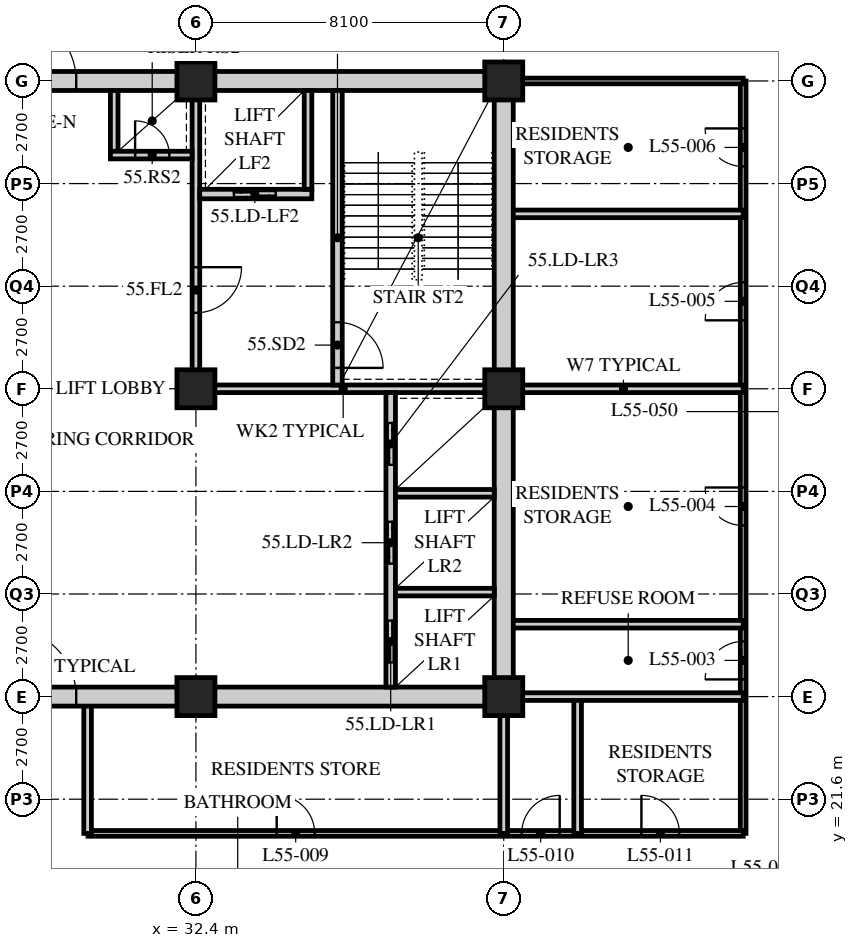
"""IFC4 building model, lengths in metres.
Left out: names, types, materials, properties, quantities, classifications, styles, units other than length and angle.
Written with IfcOpenShell. Run it as: python <this file> out.ifc"""

import sys

from ifc_helpers import new_model, si_unit, direction, frame, frame_2d, origin, origin_2d, place, context, subcontext, project, spatial, rectangle, hollow_rectangle, extrude, element, fill, save


model = new_model("IFC4")
c1 = context("Model", 3, precision=1e-05, world=origin(), true_north=direction((0.0, 1.0)))
c2 = subcontext(c1, "Body", "Model", "MODEL_VIEW")
j1 = project(units=[si_unit("LENGTHUNIT", "METRE"), si_unit("PLANEANGLEUNIT", "RADIAN")], contexts=[c1])
p1 = place(None, origin())
s1 = spatial("IfcSite", under=j1, at=p1, CompositionType="ELEMENT")
p2 = place(p1, origin())
s2 = spatial("IfcBuilding", under=s1, at=p2, CompositionType="ELEMENT")
p3 = place(p2, frame((0.0, 0.0, 213.6)))
s3 = spatial("IfcBuildingStorey", under=s2, at=p3, CompositionType="ELEMENT", Elevation=213.6)
for number, where, z_axis, x_axis in (
    (1, (32.4, 24.3, 0.0), (0.0, 0.0, 1.0), (1.0, 0.0, 0.0)),
    (2, (32.4, 32.4, 0.0), (0.0, 0.0, 1.0), (1.0, 0.0, 0.0)),
    (3, (32.4, 40.5, 0.0), (0.0, 0.0, 1.0), (1.0, 0.0, 0.0)),
    (4, (40.5, 24.3, 0.0), (0.0, 0.0, 1.0), (1.0, 0.0, 0.0)),
    (5, (40.5, 32.4, 0.0), (0.0, 0.0, 1.0), (1.0, 0.0, 0.0)),
    (6, (40.5, 40.5, 0.0), (0.0, 0.0, 1.0), (1.0, 0.0, 0.0)),
):
    element("IfcColumn", number, at=place(p3, frame(where, z_axis=z_axis, x_axis=x_axis)), inside=s3, PredefinedType="COLUMN", context=c2, shape_type="SweptSolid", body=[
        extrude(hollow_rectangle(XDim=1.0, YDim=1.0, WallThickness=0.1, at=origin_2d()), origin(), (0.0, 0.0, 1.0), 3.6),
    ])
p4 = place(p3, frame((46.8, 20.7, 0.0), z_axis=(0.0, 0.0, 1.0), x_axis=(0.0, 1.0, 0.0)))
e7 = element("IfcWall", 7, at=p4, inside=s3, PredefinedType="PARTITIONING", context=c2, shape_type="SweptSolid", body=[
    extrude(rectangle(XDim=19.8, YDim=0.15, at=frame_2d((9.9, 0.0))), origin(), (0.0, 0.0, 1.0), 3.39),
])
p5 = place(p4, frame((4.052, 0.0, 0.0)))
e8 = element("IfcOpeningElement", 8, at=p5, cuts=e7, PredefinedType="OPENING", context=c2, shape_type="SweptSolid", body=[
    extrude(rectangle(XDim=1.0, YDim=2.1, at=frame_2d((0.5, 1.05))), frame((0.0, 0.085, 0.0), z_axis=(0.0, -1.0, 0.0), x_axis=(1.0, 0.0, 0.0)), (0.0, 0.0, 1.0), 0.17),
])
p6 = place(p4, frame((8.102, 0.0, 0.0)))
e9 = element("IfcOpeningElement", 9, at=p6, cuts=e7, PredefinedType="OPENING", context=c2, shape_type="SweptSolid", body=[
    extrude(rectangle(XDim=1.0, YDim=2.1, at=frame_2d((0.5, 1.05))), frame((0.0, 0.085, 0.0), z_axis=(0.0, -1.0, 0.0), x_axis=(1.0, 0.0, 0.0)), (0.0, 0.0, 1.0), 0.17),
])
p7 = place(p4, frame((13.502, 0.0, 0.0)))
e10 = element("IfcOpeningElement", 10, at=p7, cuts=e7, PredefinedType="OPENING", context=c2, shape_type="SweptSolid", body=[
    extrude(rectangle(XDim=1.0, YDim=2.1, at=frame_2d((0.5, 1.05))), frame((0.0, 0.085, 0.0), z_axis=(0.0, -1.0, 0.0), x_axis=(1.0, 0.0, 0.0)), (0.0, 0.0, 1.0), 0.17),
])
p8 = place(p4, frame((17.552, 0.0, 0.0)))
e11 = element("IfcOpeningElement", 11, at=p8, cuts=e7, PredefinedType="OPENING", context=c2, shape_type="SweptSolid", body=[
    extrude(rectangle(XDim=1.0, YDim=2.1, at=frame_2d((0.5, 1.05))), frame((0.0, 0.085, 0.0), z_axis=(0.0, -1.0, 0.0), x_axis=(1.0, 0.0, 0.0)), (0.0, 0.0, 1.0), 0.17),
])
p9 = place(p3, frame((46.8, 40.5, 0.0), z_axis=(0.0, 0.0, 1.0), x_axis=(-1.0, 0.0, 0.0)))
e12 = element("IfcWall", 12, at=p9, inside=s3, PredefinedType="PARTITIONING", context=c2, shape_type="SweptSolid", body=[
    extrude(rectangle(XDim=6.1, YDim=0.15, at=frame_2d((3.05, 0.0))), origin(), (0.0, 0.0, 1.0), 3.39),
])
p10 = place(p3, frame((29.56, 20.7, 0.0), z_axis=(0.0, 0.0, 1.0), x_axis=(1.0, 0.0, 0.0)))
e13 = element("IfcWall", 13, at=p10, inside=s3, PredefinedType="PARTITIONING", context=c2, shape_type="SweptSolid", body=[
    extrude(rectangle(XDim=17.24, YDim=0.15, at=frame_2d((8.62, 0.0))), origin(), (0.0, 0.0, 1.0), 3.39),
])
p11 = place(p10, frame((4.965, 0.0, 0.0)))
e14 = element("IfcOpeningElement", 14, at=p11, cuts=e13, PredefinedType="OPENING", context=c2, shape_type="SweptSolid", body=[
    extrude(rectangle(XDim=1.0, YDim=2.1, at=frame_2d((0.5, 1.05))), frame((0.0, 0.085, 0.0), z_axis=(0.0, -1.0, 0.0), x_axis=(1.0, 0.0, 0.0)), (0.0, 0.0, 1.0), 0.17),
])
p12 = place(p10, frame((11.412, 0.0, 0.0)))
e15 = element("IfcOpeningElement", 15, at=p12, cuts=e13, PredefinedType="OPENING", context=c2, shape_type="SweptSolid", body=[
    extrude(rectangle(XDim=1.0, YDim=2.1, at=frame_2d((0.5, 1.05))), frame((0.0, 0.085, 0.0), z_axis=(0.0, -1.0, 0.0), x_axis=(1.0, 0.0, 0.0)), (0.0, 0.0, 1.0), 0.17),
])
p13 = place(p10, frame((14.562, 0.0, 0.0)))
e16 = element("IfcOpeningElement", 16, at=p13, cuts=e13, PredefinedType="OPENING", context=c2, shape_type="SweptSolid", body=[
    extrude(rectangle(XDim=1.0, YDim=2.1, at=frame_2d((0.5, 1.05))), frame((0.0, 0.085, 0.0), z_axis=(0.0, -1.0, 0.0), x_axis=(1.0, 0.0, 0.0)), (0.0, 0.0, 1.0), 0.17),
])
for number, where, z_axis, x_axis in (
    (17, (40.5, 32.4, 0.0), (0.0, 0.0, 1.0), (1.0, 0.0, 0.0)),
    (18, (46.8, 26.205, 0.0), (0.0, 0.0, 1.0), (-1.0, 0.0, 0.0)),
    (19, (46.8, 37.003, 0.0), (0.0, 0.0, 1.0), (-1.0, 0.0, 0.0)),
):
    element("IfcWall", number, at=place(p3, frame(where, z_axis=z_axis, x_axis=x_axis)), inside=s3, PredefinedType="SOLIDWALL", context=c2, shape_type="SweptSolid", body=[
        extrude(rectangle(XDim=6.3, YDim=0.2, at=frame_2d((3.15, 0.0))), origin(), (0.0, 0.0, 1.0), 3.39),
    ])
p14 = place(p3, frame((40.5, 20.7, 0.0), z_axis=(0.0, 0.0, 1.0), x_axis=(0.0, 1.0, 0.0)))
e20 = element("IfcWall", 20, at=p14, inside=s3, PredefinedType="SOLIDWALL", context=c2, shape_type="SweptSolid", body=[
    extrude(rectangle(XDim=3.6, YDim=0.2, at=frame_2d((1.8, 0.0))), origin(), (0.0, 0.0, 1.0), 2.778),
])
for number, where, z_axis, x_axis in (
    (21, (42.444, 20.7, 0.0), (0.0, 0.0, 1.0), (0.0, 1.0, 0.0)),
    (22, (29.55, 20.7, 0.0), (0.0, 0.0, 1.0), (0.0, 1.0, 0.0)),
):
    element("IfcWall", number, at=place(p3, frame(where, z_axis=z_axis, x_axis=x_axis)), inside=s3, PredefinedType="SOLIDWALL", context=c2, shape_type="SweptSolid", body=[
        extrude(rectangle(XDim=3.6, YDim=0.2, at=frame_2d((1.8, 0.0))), origin(), (0.0, 0.0, 1.0), 3.39),
    ])
p15 = place(p3, frame((40.5, 24.3, 0.0), z_axis=(0.0, 0.0, 1.0), x_axis=(1.0, 0.0, 0.0)))
e23 = element("IfcWall", 23, at=p15, inside=s3, PredefinedType="SOLIDWALL", context=c2, shape_type="SweptSolid", body=[
    extrude(rectangle(XDim=6.3, YDim=0.2, at=frame_2d((3.15, 0.0))), origin(), (0.0, 0.0, 1.0), 3.39),
])
p16 = place(p3, frame((15.95, 24.3, 0.0), z_axis=(0.0, 0.0, 1.0), x_axis=(1.0, 0.0, 0.0)))
e24 = element("IfcWall", 24, at=p16, inside=s3, PredefinedType="SOLIDWALL", context=c2, shape_type="SweptSolid", body=[
    extrude(rectangle(XDim=24.8, YDim=0.5, at=frame_2d((12.4, 0.0))), origin(), (0.0, 0.0, 1.0), 2.74),
])
p17 = place(p16, frame((11.5, 0.0, 0.0)))
e25 = element("IfcOpeningElement", 25, at=p17, cuts=e24, PredefinedType="OPENING", context=c2, shape_type="SweptSolid", body=[
    extrude(rectangle(XDim=1.8, YDim=2.4, at=frame_2d((0.9, 1.2))), frame((0.0, 0.26, 0.0), z_axis=(0.0, -1.0, 0.0), x_axis=(1.0, 0.0, 0.0)), (0.0, 0.0, 1.0), 0.52),
])
p18 = place(p3, frame((15.95, 40.5, 0.0), z_axis=(0.0, 0.0, 1.0), x_axis=(1.0, 0.0, 0.0)))
e26 = element("IfcWall", 26, at=p18, inside=s3, PredefinedType="SOLIDWALL", context=c2, shape_type="SweptSolid", body=[
    extrude(rectangle(XDim=24.8, YDim=0.5, at=frame_2d((12.4, 0.0))), origin(), (0.0, 0.0, 1.0), 2.74),
])
p19 = place(p18, frame((11.5, 0.0, 0.0)))
e27 = element("IfcOpeningElement", 27, at=p19, cuts=e26, PredefinedType="OPENING", context=c2, shape_type="SweptSolid", body=[
    extrude(rectangle(XDim=1.8, YDim=2.4, at=frame_2d((0.9, 1.2))), frame((0.0, 0.26, 0.0), z_axis=(0.0, -1.0, 0.0), x_axis=(1.0, 0.0, 0.0)), (0.0, 0.0, 1.0), 0.52),
])
p20 = place(p3, frame((40.5, 24.55, 0.0), z_axis=(0.0, 0.0, 1.0), x_axis=(0.0, 1.0, 0.0)))
e28 = element("IfcWall", 28, at=p20, inside=s3, PredefinedType="SOLIDWALL", context=c2, shape_type="SweptSolid", body=[
    extrude(rectangle(XDim=15.7, YDim=0.5, at=frame_2d((7.85, 0.0))), origin(), (0.0, 0.0, 1.0), 2.778),
])
p21 = place(p3, frame((32.3, 32.4, 0.0), z_axis=(0.0, 0.0, 1.0), x_axis=(1.0, 0.0, 0.0)))
e29 = element("IfcWall", 29, at=p21, inside=s3, PredefinedType="SOLIDWALL", context=c2, shape_type="SweptSolid", body=[
    extrude(rectangle(XDim=7.95, YDim=0.2, at=frame_2d((3.975, 0.0))), origin(), (0.0, 0.0, 1.0), 2.778),
])
p22 = place(p3, frame((32.4, 32.5, 0.0), z_axis=(0.0, 0.0, 1.0), x_axis=(0.0, 1.0, 0.0)))
e30 = element("IfcWall", 30, at=p22, inside=s3, PredefinedType="SOLIDWALL", context=c2, shape_type="SweptSolid", body=[
    extrude(rectangle(XDim=7.75, YDim=0.2, at=frame_2d((3.875, 0.0))), origin(), (0.0, 0.0, 1.0), 2.778),
])
p23 = place(p22, frame((1.9, 0.0, 0.0)))
e31 = element("IfcOpeningElement", 31, at=p23, cuts=e30, PredefinedType="OPENING", context=c2, shape_type="SweptSolid", body=[
    extrude(rectangle(XDim=1.2, YDim=2.1, at=frame_2d((0.6, 1.05))), frame((0.0, 0.11, 0.0), z_axis=(0.0, -1.0, 0.0), x_axis=(1.0, 0.0, 0.0)), (0.0, 0.0, 1.0), 0.22),
])
p24 = place(p3, frame((37.525, 24.55, 0.0), z_axis=(0.0, 0.0, 1.0), x_axis=(0.0, 1.0, 0.0)))
e32 = element("IfcWall", 32, at=p24, inside=s3, PredefinedType="SOLIDWALL", context=c2, shape_type="SweptSolid", body=[
    extrude(rectangle(XDim=7.75, YDim=0.25, at=frame_2d((3.875, 0.0))), origin(), (0.0, 0.0, 1.0), 3.39),
])
p25 = place(p24, frame((0.65, 0.0, 0.0)))
e33 = element("IfcOpeningElement", 33, at=p25, cuts=e32, PredefinedType="OPENING", context=c2, shape_type="SweptSolid", body=[
    extrude(rectangle(XDim=1.1, YDim=2.4, at=frame_2d((0.55, 1.2))), frame((0.0, 0.135, 0.0), z_axis=(0.0, -1.0, 0.0), x_axis=(1.0, 0.0, 0.0)), (0.0, 0.0, 1.0), 0.27),
])
p26 = place(p24, frame((3.25, 0.0, 0.0)))
e34 = element("IfcOpeningElement", 34, at=p26, cuts=e32, PredefinedType="OPENING", context=c2, shape_type="SweptSolid", body=[
    extrude(rectangle(XDim=1.1, YDim=2.4, at=frame_2d((0.55, 1.2))), frame((0.0, 0.135, 0.0), z_axis=(0.0, -1.0, 0.0), x_axis=(1.0, 0.0, 0.0)), (0.0, 0.0, 1.0), 0.27),
])
p27 = place(p24, frame((5.85, 0.0, 0.0)))
e35 = element("IfcOpeningElement", 35, at=p27, cuts=e32, PredefinedType="OPENING", context=c2, shape_type="SweptSolid", body=[
    extrude(rectangle(XDim=1.1, YDim=2.4, at=frame_2d((0.55, 1.2))), frame((0.0, 0.135, 0.0), z_axis=(0.0, -1.0, 0.0), x_axis=(1.0, 0.0, 0.0)), (0.0, 0.0, 1.0), 0.27),
])
for number, where, z_axis, x_axis in (
    (36, (37.65, 27.05, 0.0), (0.0, 0.0, 1.0), (1.0, 0.0, 0.0)),
    (37, (37.65, 29.65, 0.0), (0.0, 0.0, 1.0), (1.0, 0.0, 0.0)),
):
    element("IfcWall", number, at=place(p3, frame(where, z_axis=z_axis, x_axis=x_axis)), inside=s3, PredefinedType="SOLIDWALL", context=c2, shape_type="SweptSolid", body=[
        extrude(rectangle(XDim=2.6, YDim=0.2, at=frame_2d((1.3, 0.0))), origin(), (0.0, 0.0, 1.0), 3.39),
    ])
p28 = place(p3, frame((36.125, 32.5, 0.0), z_axis=(0.0, 0.0, 1.0), x_axis=(0.0, 1.0, 0.0)))
e38 = element("IfcWall", 38, at=p28, inside=s3, PredefinedType="SOLIDWALL", context=c2, shape_type="SweptSolid", body=[
    extrude(rectangle(XDim=7.75, YDim=0.25, at=frame_2d((3.875, 0.0))), origin(), (0.0, 0.0, 1.0), 3.39),
])
p29 = place(p28, frame((0.45, 0.0, 0.0)))
e39 = element("IfcOpeningElement", 39, at=p29, cuts=e38, PredefinedType="OPENING", context=c2, shape_type="SweptSolid", body=[
    extrude(rectangle(XDim=1.2, YDim=2.1, at=frame_2d((0.6, 1.05))), frame((0.0, 0.135, 0.0), z_axis=(0.0, -1.0, 0.0), x_axis=(1.0, 0.0, 0.0)), (0.0, 0.0, 1.0), 0.27),
])
p30 = place(p3, frame((32.5, 37.525, 0.0), z_axis=(0.0, 0.0, 1.0), x_axis=(1.0, 0.0, 0.0)))
e40 = element("IfcWall", 40, at=p30, inside=s3, PredefinedType="SOLIDWALL", context=c2, shape_type="SweptSolid", body=[
    extrude(rectangle(XDim=2.95, YDim=0.25, at=frame_2d((1.475, 0.0))), origin(), (0.0, 0.0, 1.0), 3.39),
])
p31 = place(p30, frame((0.9, 0.0, 0.0)))
e41 = element("IfcOpeningElement", 41, at=p31, cuts=e40, PredefinedType="OPENING", context=c2, shape_type="SweptSolid", body=[
    extrude(rectangle(XDim=1.1, YDim=2.4, at=frame_2d((0.55, 1.2))), frame((0.0, 0.135, 0.0), z_axis=(0.0, -1.0, 0.0), x_axis=(1.0, 0.0, 0.0)), (0.0, 0.0, 1.0), 0.27),
])
p32 = place(p3, frame((35.35, 37.65, 0.0), z_axis=(0.0, 0.0, 1.0), x_axis=(0.0, 1.0, 0.0)))
e42 = element("IfcWall", 42, at=p32, inside=s3, PredefinedType="SOLIDWALL", context=c2, shape_type="SweptSolid", body=[
    extrude(rectangle(XDim=2.6, YDim=0.2, at=frame_2d((1.3, 0.0))), origin(), (0.0, 0.0, 1.0), 3.39),
])
p33 = place(p3, frame((30.25, 38.65, 0.0), z_axis=(0.0, 0.0, 1.0), x_axis=(0.0, 1.0, 0.0)))
e43 = element("IfcWall", 43, at=p33, inside=s3, PredefinedType="SOLIDWALL", context=c2, shape_type="SweptSolid", body=[
    extrude(rectangle(XDim=1.6, YDim=0.2, at=frame_2d((0.8, 0.0))), origin(), (0.0, 0.0, 1.0), 3.39),
])
p34 = place(p3, frame((30.15, 38.55, 0.0), z_axis=(0.0, 0.0, 1.0), x_axis=(1.0, 0.0, 0.0)))
e44 = element("IfcWall", 44, at=p34, inside=s3, PredefinedType="SOLIDWALL", context=c2, shape_type="SweptSolid", body=[
    extrude(rectangle(XDim=2.15, YDim=0.2, at=frame_2d((1.075, 0.0))), origin(), (0.0, 0.0, 1.0), 3.39),
])
p35 = place(p34, frame((0.65, 0.0, 0.0)))
e45 = element("IfcOpeningElement", 45, at=p35, cuts=e44, PredefinedType="OPENING", context=c2, shape_type="SweptSolid", body=[
    extrude(rectangle(XDim=0.9, YDim=2.1, at=frame_2d((0.45, 1.05))), frame((0.0, 0.11, 0.0), z_axis=(0.0, -1.0, 0.0), x_axis=(1.0, 0.0, 0.0)), (0.0, 0.0, 1.0), 0.22),
])
p36 = place(p5, origin())
e46 = element("IfcDoor", 46, at=p36, inside=s3, OperationType="SINGLE_SWING_LEFT", PredefinedType="DOOR", context=c2, shape_type="SweptSolid", body=[
    extrude(rectangle(XDim=1.0, YDim=2.1, at=frame_2d((0.5, 1.05))), frame((0.0, 0.025, 0.0), z_axis=(0.0, -1.0, 0.0), x_axis=(1.0, 0.0, 0.0)), (0.0, 0.0, 1.0), 0.05),
])
fill(e8, e46)
p37 = place(p6, origin())
e47 = element("IfcDoor", 47, at=p37, inside=s3, OperationType="SINGLE_SWING_RIGHT", PredefinedType="DOOR", context=c2, shape_type="SweptSolid", body=[
    extrude(rectangle(XDim=1.0, YDim=2.1, at=frame_2d((0.5, 1.05))), frame((0.0, 0.025, 0.0), z_axis=(0.0, -1.0, 0.0), x_axis=(1.0, 0.0, 0.0)), (0.0, 0.0, 1.0), 0.05),
])
fill(e9, e47)
p38 = place(p7, origin())
e48 = element("IfcDoor", 48, at=p38, inside=s3, OperationType="SINGLE_SWING_LEFT", PredefinedType="DOOR", context=c2, shape_type="SweptSolid", body=[
    extrude(rectangle(XDim=1.0, YDim=2.1, at=frame_2d((0.5, 1.05))), frame((0.0, 0.025, 0.0), z_axis=(0.0, -1.0, 0.0), x_axis=(1.0, 0.0, 0.0)), (0.0, 0.0, 1.0), 0.05),
])
fill(e10, e48)
p39 = place(p8, origin())
e49 = element("IfcDoor", 49, at=p39, inside=s3, OperationType="SINGLE_SWING_RIGHT", PredefinedType="DOOR", context=c2, shape_type="SweptSolid", body=[
    extrude(rectangle(XDim=1.0, YDim=2.1, at=frame_2d((0.5, 1.05))), frame((0.0, 0.025, 0.0), z_axis=(0.0, -1.0, 0.0), x_axis=(1.0, 0.0, 0.0)), (0.0, 0.0, 1.0), 0.05),
])
fill(e11, e49)
p40 = place(p11, origin())
e50 = element("IfcDoor", 50, at=p40, inside=s3, OperationType="SINGLE_SWING_LEFT", PredefinedType="DOOR", context=c2, shape_type="SweptSolid", body=[
    extrude(rectangle(XDim=1.0, YDim=2.1, at=frame_2d((0.5, 1.05))), frame((0.0, 0.025, 0.0), z_axis=(0.0, -1.0, 0.0), x_axis=(1.0, 0.0, 0.0)), (0.0, 0.0, 1.0), 0.05),
])
fill(e14, e50)
p41 = place(p12, origin())
e51 = element("IfcDoor", 51, at=p41, inside=s3, OperationType="SINGLE_SWING_RIGHT", PredefinedType="DOOR", context=c2, shape_type="SweptSolid", body=[
    extrude(rectangle(XDim=1.0, YDim=2.1, at=frame_2d((0.5, 1.05))), frame((0.0, 0.025, 0.0), z_axis=(0.0, -1.0, 0.0), x_axis=(1.0, 0.0, 0.0)), (0.0, 0.0, 1.0), 0.05),
])
fill(e15, e51)
p42 = place(p13, origin())
e52 = element("IfcDoor", 52, at=p42, inside=s3, OperationType="SINGLE_SWING_LEFT", PredefinedType="DOOR", context=c2, shape_type="SweptSolid", body=[
    extrude(rectangle(XDim=1.0, YDim=2.1, at=frame_2d((0.5, 1.05))), frame((0.0, 0.025, 0.0), z_axis=(0.0, -1.0, 0.0), x_axis=(1.0, 0.0, 0.0)), (0.0, 0.0, 1.0), 0.05),
])
fill(e16, e52)
p43 = place(p29, origin())
e53 = element("IfcDoor", 53, at=p43, inside=s3, OperationType="SINGLE_SWING_RIGHT", PredefinedType="DOOR", context=c2, shape_type="SweptSolid", body=[
    extrude(rectangle(XDim=1.2, YDim=2.1, at=frame_2d((0.6, 1.05))), frame((0.0, 0.025, 0.0), z_axis=(0.0, -1.0, 0.0), x_axis=(1.0, 0.0, 0.0)), (0.0, 0.0, 1.0), 0.05),
])
fill(e39, e53)
p44 = place(p23, origin())
e54 = element("IfcDoor", 54, at=p44, inside=s3, OperationType="SINGLE_SWING_LEFT", PredefinedType="DOOR", context=c2, shape_type="SweptSolid", body=[
    extrude(rectangle(XDim=1.2, YDim=2.1, at=frame_2d((0.6, 1.05))), frame((0.0, 0.025, 0.0), z_axis=(0.0, -1.0, 0.0), x_axis=(1.0, 0.0, 0.0)), (0.0, 0.0, 1.0), 0.05),
])
fill(e31, e54)
p45 = place(p35, origin())
e55 = element("IfcDoor", 55, at=p45, inside=s3, OperationType="SINGLE_SWING_LEFT", PredefinedType="DOOR", context=c2, shape_type="SweptSolid", body=[
    extrude(rectangle(XDim=0.9, YDim=2.1, at=frame_2d((0.45, 1.05))), frame((0.0, 0.025, 0.0), z_axis=(0.0, -1.0, 0.0), x_axis=(1.0, 0.0, 0.0)), (0.0, 0.0, 1.0), 0.05),
])
fill(e45, e55)
p46 = place(p25, origin())
e56 = element("IfcDoor", 56, at=p46, inside=s3, OperationType="DOUBLE_DOOR_SLIDING", PredefinedType="DOOR", context=c2, shape_type="SweptSolid", body=[
    extrude(rectangle(XDim=1.1, YDim=2.4, at=frame_2d((0.55, 1.2))), frame((0.0, 0.025, 0.0), z_axis=(0.0, -1.0, 0.0), x_axis=(1.0, 0.0, 0.0)), (0.0, 0.0, 1.0), 0.05),
])
fill(e33, e56)
p47 = place(p26, origin())
e57 = element("IfcDoor", 57, at=p47, inside=s3, OperationType="DOUBLE_DOOR_SLIDING", PredefinedType="DOOR", context=c2, shape_type="SweptSolid", body=[
    extrude(rectangle(XDim=1.1, YDim=2.4, at=frame_2d((0.55, 1.2))), frame((0.0, 0.025, 0.0), z_axis=(0.0, -1.0, 0.0), x_axis=(1.0, 0.0, 0.0)), (0.0, 0.0, 1.0), 0.05),
])
fill(e34, e57)
p48 = place(p27, origin())
e58 = element("IfcDoor", 58, at=p48, inside=s3, OperationType="DOUBLE_DOOR_SLIDING", PredefinedType="DOOR", context=c2, shape_type="SweptSolid", body=[
    extrude(rectangle(XDim=1.1, YDim=2.4, at=frame_2d((0.55, 1.2))), frame((0.0, 0.025, 0.0), z_axis=(0.0, -1.0, 0.0), x_axis=(1.0, 0.0, 0.0)), (0.0, 0.0, 1.0), 0.05),
])
fill(e35, e58)
p49 = place(p31, origin())
e59 = element("IfcDoor", 59, at=p49, inside=s3, OperationType="DOUBLE_DOOR_SLIDING", PredefinedType="DOOR", context=c2, shape_type="SweptSolid", body=[
    extrude(rectangle(XDim=1.1, YDim=2.4, at=frame_2d((0.55, 1.2))), frame((0.0, 0.025, 0.0), z_axis=(0.0, -1.0, 0.0), x_axis=(1.0, 0.0, 0.0)), (0.0, 0.0, 1.0), 0.05),
])
fill(e41, e59)
p50 = place(p17, origin())
e60 = element("IfcDoor", 60, at=p50, inside=s3, OperationType="DOUBLE_DOOR_SINGLE_SWING", PredefinedType="DOOR", context=c2, shape_type="SweptSolid", body=[
    extrude(rectangle(XDim=1.8, YDim=2.4, at=frame_2d((0.9, 1.2))), frame((0.0, 0.025, 0.0), z_axis=(0.0, -1.0, 0.0), x_axis=(1.0, 0.0, 0.0)), (0.0, 0.0, 1.0), 0.05),
])
fill(e25, e60)
p51 = place(p19, origin())
e61 = element("IfcDoor", 61, at=p51, inside=s3, OperationType="DOUBLE_DOOR_SINGLE_SWING", PredefinedType="DOOR", context=c2, shape_type="SweptSolid", body=[
    extrude(rectangle(XDim=1.8, YDim=2.4, at=frame_2d((0.9, 1.2))), frame((0.0, 0.025, 0.0), z_axis=(0.0, -1.0, 0.0), x_axis=(1.0, 0.0, 0.0)), (0.0, 0.0, 1.0), 0.05),
])
fill(e27, e61)
save(model, sys.argv[1])
